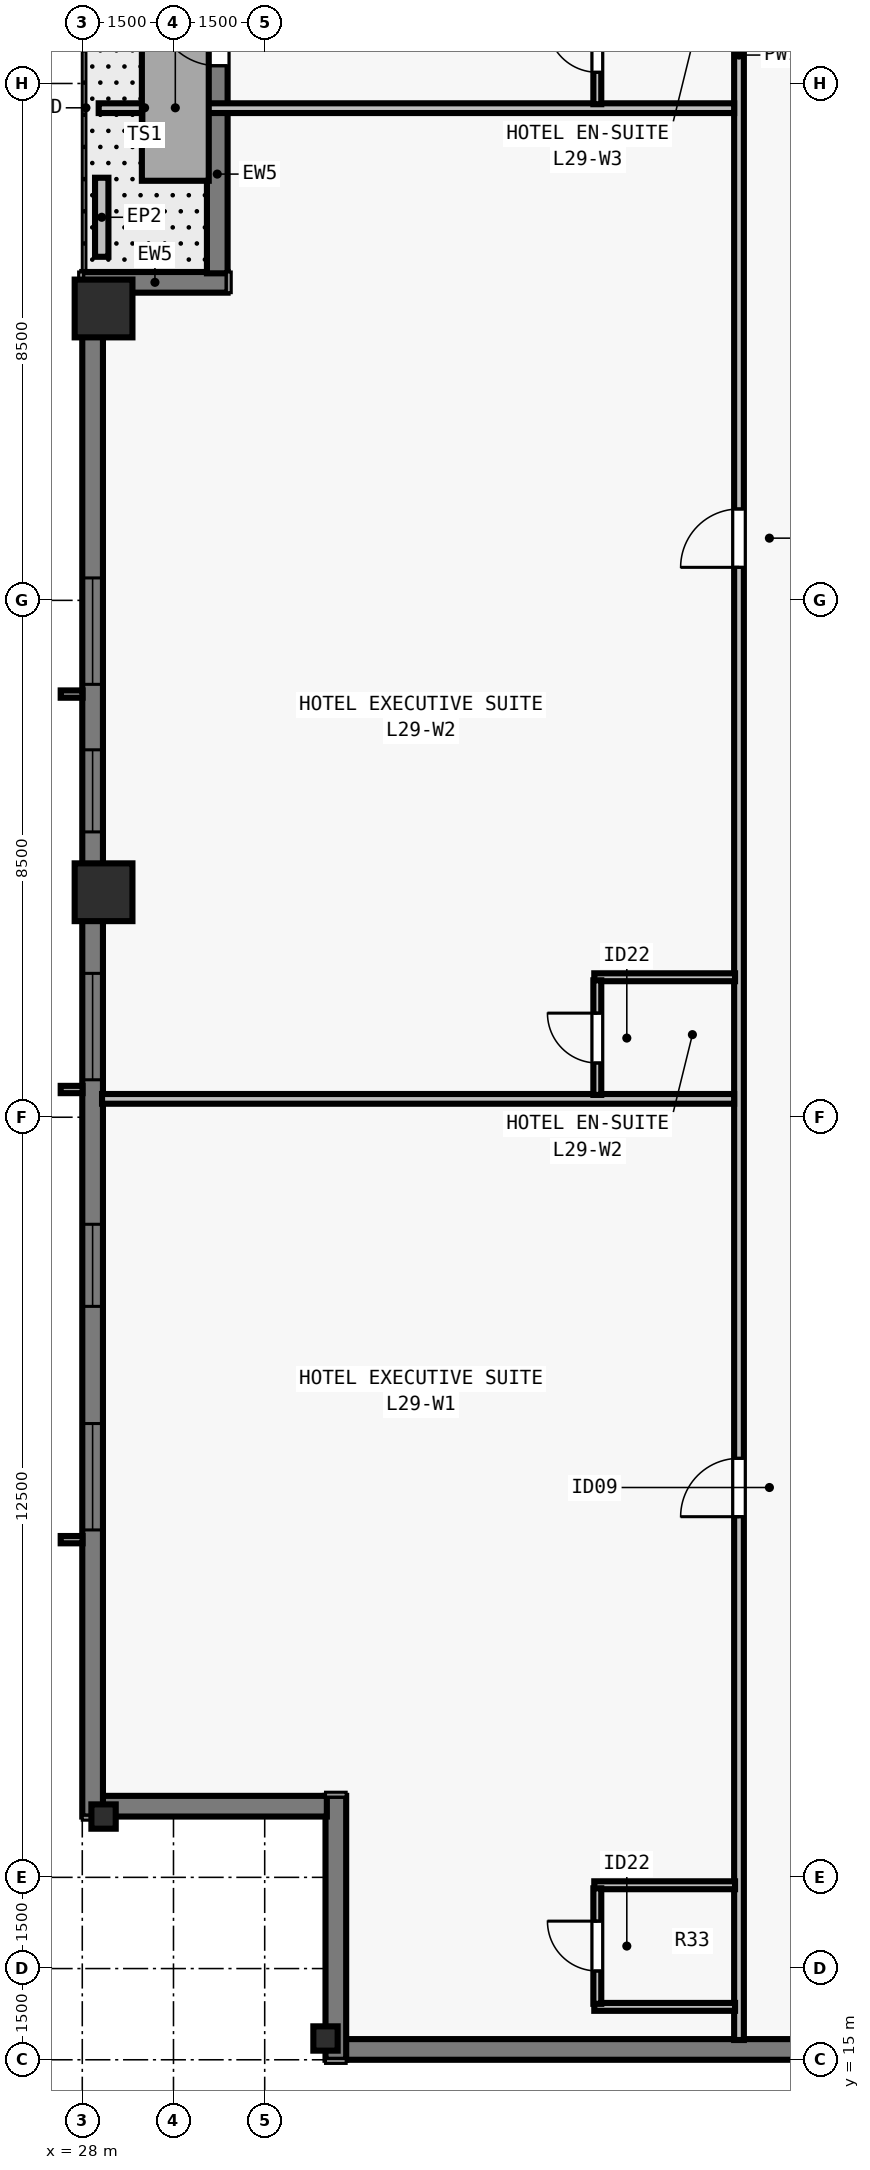
"""IFC4 building model, lengths in metres.
Left out: names, types, materials, properties, quantities, classifications, styles, units other than length and angle.
Written with IfcOpenShell. Run it as: python <this file> out.ifc"""

import sys

from ifc_helpers import new_model, si_unit, direction, frame, frame_2d, origin, origin_2d, place, context, subcontext, project, spatial, rectangle, i_section, extrude, element, fill, save


model = new_model("IFC4")
c1 = context("Model", 3, precision=1e-05, world=origin(), true_north=direction((0.0, 1.0)))
c2 = subcontext(c1, "Body", "Model", "MODEL_VIEW")
j1 = project(units=[si_unit("LENGTHUNIT", "METRE"), si_unit("PLANEANGLEUNIT", "RADIAN")], contexts=[c1])
p1 = place(None, origin())
s1 = spatial("IfcSite", under=j1, at=p1, CompositionType="ELEMENT")
p2 = place(p1, origin())
s2 = spatial("IfcBuilding", under=s1, at=p2, CompositionType="ELEMENT")
p3 = place(p2, frame((0.0, 0.0, 109.5)))
s3 = spatial("IfcBuildingStorey", under=s2, at=p3, CompositionType="ELEMENT", Elevation=109.5)
p4 = place(p3, frame((32.0, 15.35, 0.0), z_axis=(0.0, 0.0, 1.0), x_axis=(1.0, 0.0, 0.0)))
e1 = element("IfcColumn", 1, at=p4, inside=s3, PredefinedType="COLUMN", context=c2, shape_type="SweptSolid", body=[
    extrude(i_section(OverallWidth=0.4, OverallDepth=0.4, WebThickness=0.022, FlangeThickness=0.036, at=origin_2d()), origin(), (0.0, 0.0, 1.0), 3.5),
])
for number, where, z_axis, x_axis in (
    (2, (28.35, 43.8, 0.0), (0.0, 0.0, 1.0), (0.0, 1.0, 0.0)),
    (3, (28.35, 34.2, 0.0), (0.0, 0.0, 1.0), (0.0, 1.0, 0.0)),
):
    element("IfcColumn", number, at=place(p3, frame(where, z_axis=z_axis, x_axis=x_axis)), inside=s3, PredefinedType="COLUMN", context=c2, shape_type="SweptSolid", body=[
        extrude(rectangle(XDim=0.95, YDim=0.95, at=origin_2d()), origin(), (0.0, 0.0, 1.0), 3.5),
    ])
p5 = place(p3, frame((28.35, 19.0, 0.0), z_axis=(0.0, 0.0, 1.0), x_axis=(0.0, 1.0, 0.0)))
e4 = element("IfcColumn", 4, at=p5, inside=s3, PredefinedType="COLUMN", context=c2, shape_type="SweptSolid", body=[
    extrude(i_section(OverallWidth=0.4, OverallDepth=0.4, WebThickness=0.022, FlangeThickness=0.036, at=origin_2d()), origin(), (0.0, 0.0, 1.0), 3.5),
])
p6 = place(p3, frame((72.0, 15.17, 0.0), z_axis=(0.0, 0.0, 1.0), x_axis=(-1.0, 0.0, 0.0)))
e5 = element("IfcWall", 5, at=p6, inside=s3, PredefinedType="SOLIDWALL", context=c2, shape_type="SweptSolid", body=[
    extrude(rectangle(XDim=39.682, YDim=0.34, at=frame_2d((19.841, 0.0))), origin(), (0.0, 0.0, 1.0), 3.28),
])
p7 = place(p6, frame((9.355, 0.0, 0.8)))
e6 = element("IfcOpeningElement", 6, at=p7, cuts=e5, PredefinedType="OPENING", context=c2, shape_type="SweptSolid", body=[
    extrude(rectangle(XDim=1.35, YDim=1.66, at=frame_2d((0.675, 0.83))), frame((0.0, 0.18, 0.0), z_axis=(0.0, -1.0, 0.0), x_axis=(1.0, 0.0, 0.0)), (0.0, 0.0, 1.0), 0.36),
])
p8 = place(p6, frame((11.859, 0.0, 0.8)))
e7 = element("IfcOpeningElement", 7, at=p8, cuts=e5, PredefinedType="OPENING", context=c2, shape_type="SweptSolid", body=[
    extrude(rectangle(XDim=1.75, YDim=1.66, at=frame_2d((0.875, 0.83))), frame((0.0, 0.18, 0.0), z_axis=(0.0, -1.0, 0.0), x_axis=(1.0, 0.0, 0.0)), (0.0, 0.0, 1.0), 0.36),
])
p9 = place(p6, frame((16.062, 0.0, 0.8)))
e8 = element("IfcOpeningElement", 8, at=p9, cuts=e5, PredefinedType="OPENING", context=c2, shape_type="SweptSolid", body=[
    extrude(rectangle(XDim=1.35, YDim=1.66, at=frame_2d((0.675, 0.83))), frame((0.0, 0.18, 0.0), z_axis=(0.0, -1.0, 0.0), x_axis=(1.0, 0.0, 0.0)), (0.0, 0.0, 1.0), 0.36),
])
p10 = place(p6, frame((18.116, 0.0, 0.8)))
e9 = element("IfcOpeningElement", 9, at=p10, cuts=e5, PredefinedType="OPENING", context=c2, shape_type="SweptSolid", body=[
    extrude(rectangle(XDim=1.75, YDim=1.66, at=frame_2d((0.875, 0.83))), frame((0.0, 0.18, 0.0), z_axis=(0.0, -1.0, 0.0), x_axis=(1.0, 0.0, 0.0)), (0.0, 0.0, 1.0), 0.36),
])
p11 = place(p6, frame((22.719, 0.0, 0.8)))
e10 = element("IfcOpeningElement", 10, at=p11, cuts=e5, PredefinedType="OPENING", context=c2, shape_type="SweptSolid", body=[
    extrude(rectangle(XDim=1.35, YDim=1.66, at=frame_2d((0.675, 0.83))), frame((0.0, 0.18, 0.0), z_axis=(0.0, -1.0, 0.0), x_axis=(1.0, 0.0, 0.0)), (0.0, 0.0, 1.0), 0.36),
])
p12 = place(p6, frame((26.073, 0.0, 0.8)))
e11 = element("IfcOpeningElement", 11, at=p12, cuts=e5, PredefinedType="OPENING", context=c2, shape_type="SweptSolid", body=[
    extrude(rectangle(XDim=1.75, YDim=1.66, at=frame_2d((0.875, 0.83))), frame((0.0, 0.18, 0.0), z_axis=(0.0, -1.0, 0.0), x_axis=(1.0, 0.0, 0.0)), (0.0, 0.0, 1.0), 0.36),
])
p13 = place(p6, frame((29.377, 0.0, 0.8)))
e12 = element("IfcOpeningElement", 12, at=p13, cuts=e5, PredefinedType="OPENING", context=c2, shape_type="SweptSolid", body=[
    extrude(rectangle(XDim=1.35, YDim=1.66, at=frame_2d((0.675, 0.83))), frame((0.0, 0.18, 0.0), z_axis=(0.0, -1.0, 0.0), x_axis=(1.0, 0.0, 0.0)), (0.0, 0.0, 1.0), 0.36),
])
p14 = place(p3, frame((32.17, 15.0, 0.0), z_axis=(0.0, 0.0, 1.0), x_axis=(0.0, 1.0, 0.0)))
e13 = element("IfcWall", 13, at=p14, inside=s3, PredefinedType="SOLIDWALL", context=c2, shape_type="SweptSolid", body=[
    extrude(rectangle(XDim=4.34, YDim=0.34, at=frame_2d((2.17, 0.0))), origin(), (0.0, 0.0, 1.0), 3.28),
])
p15 = place(p3, frame((32.022, 19.17, 0.0), z_axis=(0.0, 0.0, 1.0), x_axis=(-1.0, 0.0, 0.0)))
e14 = element("IfcWall", 14, at=p15, inside=s3, PredefinedType="SOLIDWALL", context=c2, shape_type="SweptSolid", body=[
    extrude(rectangle(XDim=3.704, YDim=0.34, at=frame_2d((1.852, 0.0))), origin(), (0.0, 0.0, 1.0), 3.28),
])
p16 = place(p3, frame((28.17, 19.0, 0.0), z_axis=(0.0, 0.0, 1.0), x_axis=(0.0, 1.0, 0.0)))
e15 = element("IfcWall", 15, at=p16, inside=s3, PredefinedType="SOLIDWALL", context=c2, shape_type="SweptSolid", body=[
    extrude(rectangle(XDim=25.082, YDim=0.34, at=frame_2d((12.541, 0.0))), origin(), (0.0, 0.0, 1.0), 3.28),
])
p17 = place(p16, frame((4.713, 0.0, 0.8)))
e16 = element("IfcOpeningElement", 16, at=p17, cuts=e15, PredefinedType="OPENING", context=c2, shape_type="SweptSolid", body=[
    extrude(rectangle(XDim=1.75, YDim=1.66, at=frame_2d((0.875, 0.83))), frame((0.0, 0.18, 0.0), z_axis=(0.0, -1.0, 0.0), x_axis=(1.0, 0.0, 0.0)), (0.0, 0.0, 1.0), 0.36),
])
p18 = place(p16, frame((8.39, 0.0, 0.8)))
e17 = element("IfcOpeningElement", 17, at=p18, cuts=e15, PredefinedType="OPENING", context=c2, shape_type="SweptSolid", body=[
    extrude(rectangle(XDim=1.35, YDim=1.66, at=frame_2d((0.675, 0.83))), frame((0.0, 0.18, 0.0), z_axis=(0.0, -1.0, 0.0), x_axis=(1.0, 0.0, 0.0)), (0.0, 0.0, 1.0), 0.36),
])
p19 = place(p16, frame((12.116, 0.0, 0.8)))
e18 = element("IfcOpeningElement", 18, at=p19, cuts=e15, PredefinedType="OPENING", context=c2, shape_type="SweptSolid", body=[
    extrude(rectangle(XDim=1.75, YDim=1.66, at=frame_2d((0.875, 0.83))), frame((0.0, 0.18, 0.0), z_axis=(0.0, -1.0, 0.0), x_axis=(1.0, 0.0, 0.0)), (0.0, 0.0, 1.0), 0.36),
])
p20 = place(p16, frame((16.192, 0.0, 0.8)))
e19 = element("IfcOpeningElement", 19, at=p20, cuts=e15, PredefinedType="OPENING", context=c2, shape_type="SweptSolid", body=[
    extrude(rectangle(XDim=1.35, YDim=1.66, at=frame_2d((0.675, 0.83))), frame((0.0, 0.18, 0.0), z_axis=(0.0, -1.0, 0.0), x_axis=(1.0, 0.0, 0.0)), (0.0, 0.0, 1.0), 0.36),
])
p21 = place(p16, frame((18.619, 0.0, 0.8)))
e20 = element("IfcOpeningElement", 20, at=p21, cuts=e15, PredefinedType="OPENING", context=c2, shape_type="SweptSolid", body=[
    extrude(rectangle(XDim=1.75, YDim=1.66, at=frame_2d((0.875, 0.83))), frame((0.0, 0.18, 0.0), z_axis=(0.0, -1.0, 0.0), x_axis=(1.0, 0.0, 0.0)), (0.0, 0.0, 1.0), 0.36),
])
p22 = place(p3, frame((28.0, 44.23, 0.0), z_axis=(0.0, 0.0, 1.0), x_axis=(1.0, 0.0, 0.0)))
e21 = element("IfcWall", 21, at=p22, inside=s3, PredefinedType="SOLIDWALL", context=c2, shape_type="SweptSolid", body=[
    extrude(rectangle(XDim=2.39, YDim=0.34, at=frame_2d((1.195, 0.0))), origin(), (0.0, 0.0, 1.0), 3.28),
])
p23 = place(p3, frame((30.22, 44.378, 0.0), z_axis=(0.0, 0.0, 1.0), x_axis=(0.0, 1.0, 0.0)))
e22 = element("IfcWall", 22, at=p23, inside=s3, PredefinedType="SOLIDWALL", context=c2, shape_type="SweptSolid", body=[
    extrude(rectangle(XDim=5.762, YDim=0.34, at=frame_2d((2.881, 0.0))), origin(), (0.0, 0.0, 1.0), 3.28),
])
p24 = place(p23, frame((3.414, 0.0, 0.0)))
e23 = element("IfcOpeningElement", 23, at=p24, cuts=e22, PredefinedType="OPENING", context=c2, shape_type="SweptSolid", body=[
    extrude(rectangle(XDim=1.0, YDim=2.15, at=frame_2d((0.5, 1.075))), frame((0.0, 0.18, 0.0), z_axis=(0.0, -1.0, 0.0), x_axis=(1.0, 0.0, 0.0)), (0.0, 0.0, 1.0), 0.36),
])
p25 = place(p3, frame((28.32, 44.65, 0.0), z_axis=(0.0, 0.0, 1.0), x_axis=(0.0, 1.0, 0.0)))
e24 = element("IfcWall", 24, at=p25, inside=s3, PredefinedType="PARAPET", context=c2, shape_type="SweptSolid", body=[
    extrude(rectangle(XDim=1.3, YDim=0.22, at=frame_2d((0.65, 0.0))), origin(), (0.0, 0.0, 1.0), 0.55),
])
p26 = place(p3, frame((38.8, 15.325, 0.0), z_axis=(0.0, 0.0, 1.0), x_axis=(0.0, 1.0, 0.0)))
e25 = element("IfcWall", 25, at=p26, inside=s3, PredefinedType="PARTITIONING", context=c2, shape_type="SweptSolid", body=[
    extrude(rectangle(XDim=47.35, YDim=0.16, at=frame_2d((23.675, 0.0))), origin(), (0.0, 0.0, 1.0), 2.555),
])
p27 = place(p26, frame((8.606, 0.0, 0.0)))
e26 = element("IfcOpeningElement", 26, at=p27, cuts=e25, PredefinedType="OPENING", context=c2, shape_type="SweptSolid", body=[
    extrude(rectangle(XDim=0.96, YDim=2.15, at=frame_2d((0.48, 1.075))), frame((0.0, 0.09, 0.0), z_axis=(0.0, -1.0, 0.0), x_axis=(1.0, 0.0, 0.0)), (0.0, 0.0, 1.0), 0.18),
])
p28 = place(p26, frame((24.218, 0.0, 0.0)))
e27 = element("IfcOpeningElement", 27, at=p28, cuts=e25, PredefinedType="OPENING", context=c2, shape_type="SweptSolid", body=[
    extrude(rectangle(XDim=0.96, YDim=2.15, at=frame_2d((0.48, 1.075))), frame((0.0, 0.09, 0.0), z_axis=(0.0, -1.0, 0.0), x_axis=(1.0, 0.0, 0.0)), (0.0, 0.0, 1.0), 0.18),
])
p29 = place(p26, frame((40.107, 0.0, 0.0)))
e28 = element("IfcOpeningElement", 28, at=p29, cuts=e25, PredefinedType="OPENING", context=c2, shape_type="SweptSolid", body=[
    extrude(rectangle(XDim=0.96, YDim=2.15, at=frame_2d((0.48, 1.075))), frame((0.0, 0.09, 0.0), z_axis=(0.0, -1.0, 0.0), x_axis=(1.0, 0.0, 0.0)), (0.0, 0.0, 1.0), 0.18),
])
for number, where, z_axis, x_axis in (
    (29, (36.42, 15.87, 0.0), (0.0, 0.0, 1.0), (1.0, 0.0, 0.0)),
    (30, (36.42, 17.87, 0.0), (0.0, 0.0, 1.0), (1.0, 0.0, 0.0)),
):
    element("IfcWall", number, at=place(p3, frame(where, z_axis=z_axis, x_axis=x_axis)), inside=s3, PredefinedType="PLUMBINGWALL", context=c2, shape_type="SweptSolid", body=[
        extrude(rectangle(XDim=2.315, YDim=0.13, at=frame_2d((1.158, 0.0))), origin(), (0.0, 0.0, 1.0), 3.28),
    ])
p30 = place(p3, frame((36.47, 15.92, 0.0), z_axis=(0.0, 0.0, 1.0), x_axis=(0.0, 1.0, 0.0)))
e31 = element("IfcWall", 31, at=p30, inside=s3, PredefinedType="PLUMBINGWALL", context=c2, shape_type="SweptSolid", body=[
    extrude(rectangle(XDim=1.9, YDim=0.13, at=frame_2d((0.95, 0.0))), origin(), (0.0, 0.0, 1.0), 3.28),
])
p31 = place(p30, frame((0.54, 0.0, 0.0)))
e32 = element("IfcOpeningElement", 32, at=p31, cuts=e31, PredefinedType="OPENING", context=c2, shape_type="SweptSolid", body=[
    extrude(rectangle(XDim=0.82, YDim=2.1, at=frame_2d((0.41, 1.05))), frame((0.0, 0.075, 0.0), z_axis=(0.0, -1.0, 0.0), x_axis=(1.0, 0.0, 0.0)), (0.0, 0.0, 1.0), 0.15),
])
p32 = place(p3, frame((28.325, 30.802, 0.0), z_axis=(0.0, 0.0, 1.0), x_axis=(1.0, 0.0, 0.0)))
e33 = element("IfcWall", 33, at=p32, inside=s3, PredefinedType="PARTITIONING", context=c2, shape_type="SweptSolid", body=[
    extrude(rectangle(XDim=10.395, YDim=0.16, at=frame_2d((5.198, 0.0))), origin(), (0.0, 0.0, 1.0), 3.28),
])
p33 = place(p3, frame((36.42, 32.802, 0.0), z_axis=(0.0, 0.0, 1.0), x_axis=(1.0, 0.0, 0.0)))
e34 = element("IfcWall", 34, at=p33, inside=s3, PredefinedType="PLUMBINGWALL", context=c2, shape_type="SweptSolid", body=[
    extrude(rectangle(XDim=2.315, YDim=0.13, at=frame_2d((1.158, 0.0))), origin(), (0.0, 0.0, 1.0), 3.28),
])
p34 = place(p3, frame((36.47, 30.867, 0.0), z_axis=(0.0, 0.0, 1.0), x_axis=(0.0, 1.0, 0.0)))
e35 = element("IfcWall", 35, at=p34, inside=s3, PredefinedType="PLUMBINGWALL", context=c2, shape_type="SweptSolid", body=[
    extrude(rectangle(XDim=1.885, YDim=0.13, at=frame_2d((0.942, 0.0))), origin(), (0.0, 0.0, 1.0), 3.28),
])
p35 = place(p34, frame((0.525, 0.0, 0.0)))
e36 = element("IfcOpeningElement", 36, at=p35, cuts=e35, PredefinedType="OPENING", context=c2, shape_type="SweptSolid", body=[
    extrude(rectangle(XDim=0.82, YDim=2.1, at=frame_2d((0.41, 1.05))), frame((0.0, 0.075, 0.0), z_axis=(0.0, -1.0, 0.0), x_axis=(1.0, 0.0, 0.0)), (0.0, 0.0, 1.0), 0.15),
])
p36 = place(p3, frame((28.27, 47.094, 0.0), z_axis=(0.0, 0.0, 1.0), x_axis=(1.0, 0.0, 0.0)))
e37 = element("IfcWall", 37, at=p36, inside=s3, PredefinedType="PARTITIONING", context=c2, shape_type="SweptSolid", body=[
    extrude(rectangle(XDim=10.45, YDim=0.16, at=frame_2d((5.225, 0.0))), origin(), (0.0, 0.0, 1.0), 3.28),
])
p37 = place(p3, frame((36.47, 47.159, 0.0), z_axis=(0.0, 0.0, 1.0), x_axis=(0.0, 1.0, 0.0)))
e38 = element("IfcWall", 38, at=p37, inside=s3, PredefinedType="PLUMBINGWALL", context=c2, shape_type="SweptSolid", body=[
    extrude(rectangle(XDim=1.885, YDim=0.13, at=frame_2d((0.942, 0.0))), origin(), (0.0, 0.0, 1.0), 3.28),
])
p38 = place(p37, frame((0.525, 0.0, 0.0)))
e39 = element("IfcOpeningElement", 39, at=p38, cuts=e38, PredefinedType="OPENING", context=c2, shape_type="SweptSolid", body=[
    extrude(rectangle(XDim=0.82, YDim=2.1, at=frame_2d((0.41, 1.05))), frame((0.0, 0.075, 0.0), z_axis=(0.0, -1.0, 0.0), x_axis=(1.0, 0.0, 0.0)), (0.0, 0.0, 1.0), 0.15),
])
p39 = place(p17, origin())
e40 = element("IfcWindow", 40, at=p39, inside=s3, PartitioningType="SINGLE_PANEL", PredefinedType="WINDOW", context=c2, shape_type="SweptSolid", body=[
    extrude(rectangle(XDim=1.75, YDim=1.66, at=frame_2d((0.875, 0.83))), frame((0.0, -0.05, 0.0), z_axis=(0.0, -1.0, 0.0), x_axis=(1.0, 0.0, 0.0)), (0.0, 0.0, 1.0), 0.06),
])
fill(e16, e40)
p40 = place(p18, origin())
e41 = element("IfcWindow", 41, at=p40, inside=s3, PartitioningType="SINGLE_PANEL", PredefinedType="WINDOW", context=c2, shape_type="SweptSolid", body=[
    extrude(rectangle(XDim=1.35, YDim=1.66, at=frame_2d((0.675, 0.83))), frame((0.0, -0.05, 0.0), z_axis=(0.0, -1.0, 0.0), x_axis=(1.0, 0.0, 0.0)), (0.0, 0.0, 1.0), 0.06),
])
fill(e17, e41)
p41 = place(p19, origin())
e42 = element("IfcWindow", 42, at=p41, inside=s3, PartitioningType="SINGLE_PANEL", PredefinedType="WINDOW", context=c2, shape_type="SweptSolid", body=[
    extrude(rectangle(XDim=1.75, YDim=1.66, at=frame_2d((0.875, 0.83))), frame((0.0, -0.05, 0.0), z_axis=(0.0, -1.0, 0.0), x_axis=(1.0, 0.0, 0.0)), (0.0, 0.0, 1.0), 0.06),
])
fill(e18, e42)
p42 = place(p20, origin())
e43 = element("IfcWindow", 43, at=p42, inside=s3, PartitioningType="SINGLE_PANEL", PredefinedType="WINDOW", context=c2, shape_type="SweptSolid", body=[
    extrude(rectangle(XDim=1.35, YDim=1.66, at=frame_2d((0.675, 0.83))), frame((0.0, -0.05, 0.0), z_axis=(0.0, -1.0, 0.0), x_axis=(1.0, 0.0, 0.0)), (0.0, 0.0, 1.0), 0.06),
])
fill(e19, e43)
p43 = place(p21, origin())
e44 = element("IfcWindow", 44, at=p43, inside=s3, PartitioningType="SINGLE_PANEL", PredefinedType="WINDOW", context=c2, shape_type="SweptSolid", body=[
    extrude(rectangle(XDim=1.75, YDim=1.66, at=frame_2d((0.875, 0.83))), frame((0.0, -0.05, 0.0), z_axis=(0.0, -1.0, 0.0), x_axis=(1.0, 0.0, 0.0)), (0.0, 0.0, 1.0), 0.06),
])
fill(e20, e44)
p44 = place(p24, origin())
e45 = element("IfcDoor", 45, at=p44, inside=s3, OperationType="SINGLE_SWING_RIGHT", PredefinedType="DOOR", context=c2, shape_type="SweptSolid", body=[
    extrude(rectangle(XDim=1.0, YDim=2.15, at=frame_2d((0.5, 1.075))), frame((0.0, 0.025, 0.0), z_axis=(0.0, -1.0, 0.0), x_axis=(1.0, 0.0, 0.0)), (0.0, 0.0, 1.0), 0.05),
])
fill(e23, e45)
p45 = place(p31, origin())
e46 = element("IfcDoor", 46, at=p45, inside=s3, OperationType="SINGLE_SWING_RIGHT", PredefinedType="DOOR", context=c2, shape_type="SweptSolid", body=[
    extrude(rectangle(XDim=0.82, YDim=2.1, at=frame_2d((0.41, 1.05))), frame((0.0, 0.025, 0.0), z_axis=(0.0, -1.0, 0.0), x_axis=(1.0, 0.0, 0.0)), (0.0, 0.0, 1.0), 0.05),
])
fill(e32, e46)
p46 = place(p27, origin())
e47 = element("IfcDoor", 47, at=p46, inside=s3, OperationType="SINGLE_SWING_LEFT", PredefinedType="DOOR", context=c2, shape_type="SweptSolid", body=[
    extrude(rectangle(XDim=0.96, YDim=2.15, at=frame_2d((0.48, 1.075))), frame((0.0, 0.025, 0.0), z_axis=(0.0, -1.0, 0.0), x_axis=(1.0, 0.0, 0.0)), (0.0, 0.0, 1.0), 0.05),
])
fill(e26, e47)
p47 = place(p35, origin())
e48 = element("IfcDoor", 48, at=p47, inside=s3, OperationType="SINGLE_SWING_RIGHT", PredefinedType="DOOR", context=c2, shape_type="SweptSolid", body=[
    extrude(rectangle(XDim=0.82, YDim=2.1, at=frame_2d((0.41, 1.05))), frame((0.0, 0.025, 0.0), z_axis=(0.0, -1.0, 0.0), x_axis=(1.0, 0.0, 0.0)), (0.0, 0.0, 1.0), 0.05),
])
fill(e36, e48)
p48 = place(p28, origin())
e49 = element("IfcDoor", 49, at=p48, inside=s3, OperationType="SINGLE_SWING_LEFT", PredefinedType="DOOR", context=c2, shape_type="SweptSolid", body=[
    extrude(rectangle(XDim=0.96, YDim=2.15, at=frame_2d((0.48, 1.075))), frame((0.0, 0.025, 0.0), z_axis=(0.0, -1.0, 0.0), x_axis=(1.0, 0.0, 0.0)), (0.0, 0.0, 1.0), 0.05),
])
fill(e27, e49)
p49 = place(p38, origin())
e50 = element("IfcDoor", 50, at=p49, inside=s3, OperationType="SINGLE_SWING_RIGHT", PredefinedType="DOOR", context=c2, shape_type="SweptSolid", body=[
    extrude(rectangle(XDim=0.82, YDim=2.1, at=frame_2d((0.41, 1.05))), frame((0.0, 0.025, 0.0), z_axis=(0.0, -1.0, 0.0), x_axis=(1.0, 0.0, 0.0)), (0.0, 0.0, 1.0), 0.05),
])
fill(e39, e50)
save(model, sys.argv[1])
